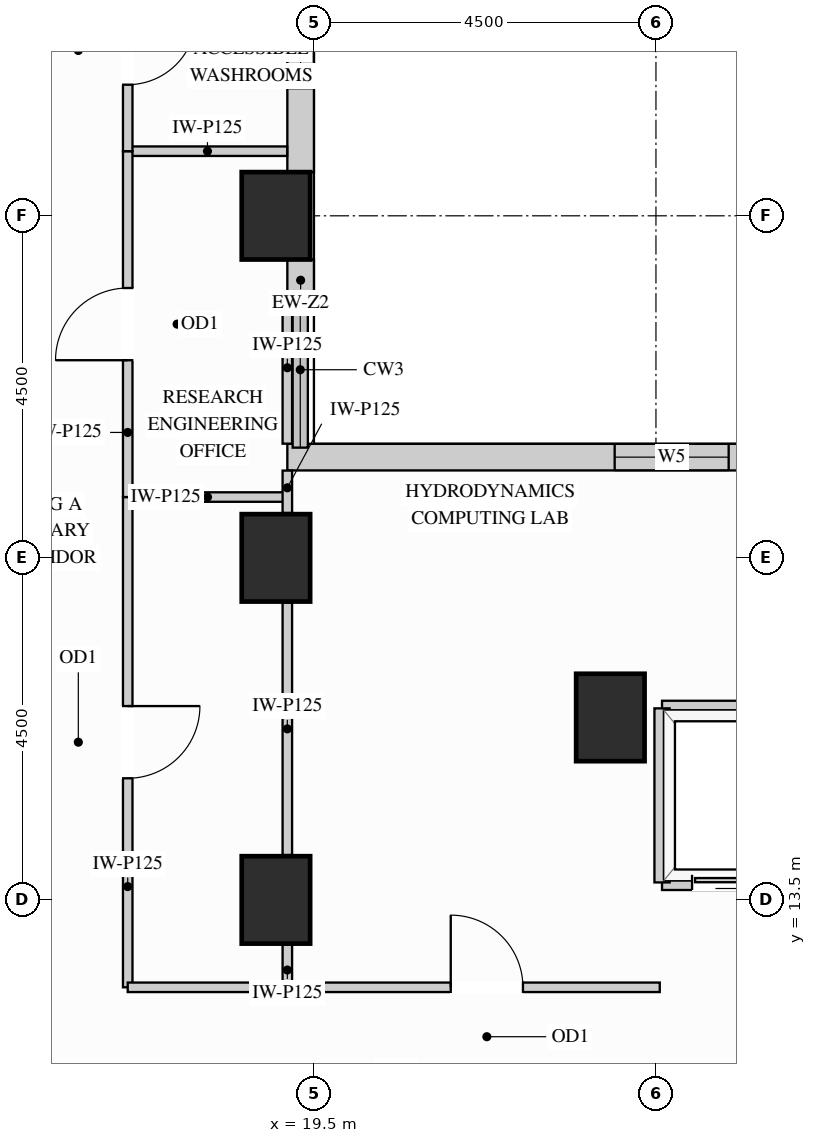
"""IFC4 building model, lengths in metres.
Left out: names, types, materials, properties, quantities, classifications, styles, units other than length and angle.
Written with IfcOpenShell. Run it as: python <this file> out.ifc"""

import sys

from ifc_helpers import new_model, si_unit, direction, frame, frame_2d, origin, origin_2d, place, context, subcontext, project, spatial, rectangle, extrude, source, transform, mapped, element, fill, save


model = new_model("IFC4")
c1 = context("Model", 3, precision=1e-05, world=origin(), true_north=direction((0.0, 1.0)))
c2 = subcontext(c1, "Body", "Model", "MODEL_VIEW")
j1 = project(units=[si_unit("LENGTHUNIT", "METRE"), si_unit("PLANEANGLEUNIT", "RADIAN")], contexts=[c1])
p1 = place(None, origin())
s1 = spatial("IfcSite", under=j1, at=p1, CompositionType="ELEMENT")
p2 = place(p1, origin())
s2 = spatial("IfcBuilding", under=s1, at=p2, CompositionType="ELEMENT")
p3 = place(p2, frame((0.0, 0.0, 95.4)))
s3 = spatial("IfcBuildingStorey", under=s2, at=p3, CompositionType="ELEMENT", Elevation=95.4)
m1 = source(origin(), c2, "Body", "SweptSolid", [
    extrude(rectangle(XDim=0.9, YDim=1.15, at=origin_2d()), origin(), (0.0, 0.0, 1.0), 3.38),
])
for number, where, z_axis, x_axis in (
    (1, (19.0, 13.5, 0.0), (0.0, 0.0, 1.0), (1.0, 0.0, 0.0)),
    (2, (19.0, 18.0, 0.0), (0.0, 0.0, 1.0), (1.0, 0.0, 0.0)),
    (3, (19.0, 22.5, 0.0), (0.0, 0.0, 1.0), (1.0, 0.0, 0.0)),
    (4, (23.4, 15.9, 0.0), (0.0, 0.0, 1.0), (1.0, 0.0, 0.0)),
):
    element("IfcColumn", number, at=place(p3, frame(where, z_axis=z_axis, x_axis=x_axis)), inside=s3, PredefinedType="COLUMN", context=c2, shape_type="MappedRepresentation", body=[
        mapped(m1, transform((0.0, 0.0, 0.0), x_axis=(1.0, 0.0, 0.0), y_axis=(0.0, 1.0, 0.0), z_axis=(0.0, 0.0, 1.0))),
    ])
m2 = source(origin(), c2, "Body", "SweptSolid", [
    extrude(rectangle(XDim=0.427, YDim=0.35, at=frame_2d((0.213, 0.0))), origin(), (0.0, 0.0, 1.0), 2.519),
])
p4 = place(p3, frame((19.325, 21.5, 0.0), z_axis=(0.0, 0.0, 1.0), x_axis=(0.0, 1.0, 0.0)))
e5 = element("IfcWall", 5, at=p4, inside=s3, PredefinedType="SOLIDWALL", context=c2, shape_type="MappedRepresentation", body=[
    mapped(m2, transform((0.0, 0.0, 0.0), x_axis=(1.0, 0.0, 0.0), y_axis=(0.0, 1.0, 0.0), z_axis=(0.0, 0.0, 1.0))),
])
p5 = place(p3, frame((19.325, 23.073, 0.0), z_axis=(0.0, 0.0, 1.0), x_axis=(0.0, 1.0, 0.0)))
e6 = element("IfcWall", 6, at=p5, inside=s3, PredefinedType="SOLIDWALL", context=c2, shape_type="SweptSolid", body=[
    extrude(rectangle(XDim=3.154, YDim=0.35, at=frame_2d((1.577, 0.0))), origin(), (0.0, 0.0, 1.0), 2.519),
])
p6 = place(p5, frame((1.105, 0.0, 0.78)))
e7 = element("IfcOpeningElement", 7, at=p6, cuts=e6, PredefinedType="OPENING", context=c2, shape_type="SweptSolid", body=[
    extrude(rectangle(XDim=1.5, YDim=1.559, at=frame_2d((0.75, 0.78))), frame((0.0, 0.185, 0.0), z_axis=(0.0, -1.0, 0.0), x_axis=(1.0, 0.0, 0.0)), (0.0, 0.0, 1.0), 0.37),
])
p7 = place(p3, frame((34.75, 19.325, 0.0), z_axis=(0.0, 0.0, 1.0), x_axis=(-1.0, 0.0, 0.0)))
e8 = element("IfcWall", 8, at=p7, inside=s3, PredefinedType="SOLIDWALL", context=c2, shape_type="SweptSolid", body=[
    extrude(rectangle(XDim=15.6, YDim=0.35, at=frame_2d((7.8, 0.0))), origin(), (0.0, 0.0, 1.0), 3.365),
])
p8 = place(p7, frame((4.307, 0.0, 0.78)))
e9 = element("IfcOpeningElement", 9, at=p8, cuts=e8, PredefinedType="OPENING", context=c2, shape_type="SweptSolid", body=[
    extrude(rectangle(XDim=1.5, YDim=2.0, at=frame_2d((0.75, 1.0))), frame((0.0, 0.185, 0.0), z_axis=(0.0, -1.0, 0.0), x_axis=(1.0, 0.0, 0.0)), (0.0, 0.0, 1.0), 0.37),
])
p9 = place(p7, frame((9.793, 0.0, 0.78)))
e10 = element("IfcOpeningElement", 10, at=p9, cuts=e8, PredefinedType="OPENING", context=c2, shape_type="SweptSolid", body=[
    extrude(rectangle(XDim=1.5, YDim=2.0, at=frame_2d((0.75, 1.0))), frame((0.0, 0.185, 0.0), z_axis=(0.0, -1.0, 0.0), x_axis=(1.0, 0.0, 0.0)), (0.0, 0.0, 1.0), 0.37),
])
m3 = source(origin(), c2, "Body", "SweptSolid", [
    extrude(rectangle(XDim=2.1, YDim=0.125, at=frame_2d((1.05, 0.0))), origin(), (0.0, 0.0, 1.0), 3.365),
])
p10 = place(p3, frame((17.05, 18.8, 0.0), z_axis=(0.0, 0.0, 1.0), x_axis=(1.0, 0.0, 0.0)))
e11 = element("IfcWall", 11, at=p10, inside=s3, PredefinedType="PARTITIONING", context=c2, shape_type="MappedRepresentation", body=[
    mapped(m3, transform((0.0, 0.0, 0.0), x_axis=(1.0, 0.0, 0.0), y_axis=(0.0, 1.0, 0.0), z_axis=(0.0, 0.0, 1.0))),
])
m4 = source(origin(), c2, "Body", "SweptSolid", [
    extrude(rectangle(XDim=2.098, YDim=0.125, at=frame_2d((1.049, 0.0))), origin(), (0.0, 0.0, 1.0), 3.365),
])
p11 = place(p3, frame((17.05, 23.35, 0.0), z_axis=(0.0, 0.0, 1.0), x_axis=(1.0, 0.0, 0.0)))
e12 = element("IfcWall", 12, at=p11, inside=s3, PredefinedType="PARTITIONING", context=c2, shape_type="MappedRepresentation", body=[
    mapped(m4, transform((0.0, 0.0, 0.0), x_axis=(1.0, 0.0, 0.0), y_axis=(0.0, 1.0, 0.0), z_axis=(0.0, 0.0, 1.0))),
])
m5 = source(origin(), c2, "Body", "SweptSolid", [
    extrude(rectangle(XDim=0.56, YDim=0.125, at=frame_2d((0.28, 0.0))), origin(), (0.0, 0.0, 1.0), 2.677),
])
p12 = place(p3, frame((19.15, 12.35, 0.0), z_axis=(0.0, 0.0, 1.0), x_axis=(0.0, 1.0, 0.0)))
e13 = element("IfcWall", 13, at=p12, inside=s3, PredefinedType="PARTITIONING", context=c2, shape_type="MappedRepresentation", body=[
    mapped(m5, transform((0.0, 0.0, 0.0), x_axis=(1.0, 0.0, 0.0), y_axis=(0.0, 1.0, 0.0), z_axis=(0.0, 0.0, 1.0))),
])
m6 = source(origin(), c2, "Body", "SweptSolid", [
    extrude(rectangle(XDim=3.32, YDim=0.125, at=frame_2d((1.66, 0.0))), origin(), (0.0, 0.0, 1.0), 2.677),
])
p13 = place(p3, frame((19.15, 14.09, 0.0), z_axis=(0.0, 0.0, 1.0), x_axis=(0.0, 1.0, 0.0)))
e14 = element("IfcWall", 14, at=p13, inside=s3, PredefinedType="PARTITIONING", context=c2, shape_type="MappedRepresentation", body=[
    mapped(m6, transform((0.0, 0.0, 0.0), x_axis=(1.0, 0.0, 0.0), y_axis=(0.0, 1.0, 0.0), z_axis=(0.0, 0.0, 1.0))),
])
m7 = source(origin(), c2, "Body", "SweptSolid", [
    extrude(rectangle(XDim=0.558, YDim=0.125, at=frame_2d((0.279, 0.0))), origin(), (0.0, 0.0, 1.0), 2.519),
])
p14 = place(p3, frame((19.15, 18.59, 0.0), z_axis=(0.0, 0.0, 1.0), x_axis=(0.0, 1.0, 0.0)))
e15 = element("IfcWall", 15, at=p14, inside=s3, PredefinedType="PARTITIONING", context=c2, shape_type="MappedRepresentation", body=[
    mapped(m7, transform((0.0, 0.0, 0.0), x_axis=(1.0, 0.0, 0.0), y_axis=(0.0, 1.0, 0.0), z_axis=(0.0, 0.0, 1.0))),
])
m8 = source(origin(), c2, "Body", "SweptSolid", [
    extrude(rectangle(XDim=1.998, YDim=0.125, at=frame_2d((0.999, 0.0))), origin(), (0.0, 0.0, 1.0), 2.519),
])
p15 = place(p3, frame((19.15, 19.502, 0.0), z_axis=(0.0, 0.0, 1.0), x_axis=(0.0, 1.0, 0.0)))
e16 = element("IfcWall", 16, at=p15, inside=s3, PredefinedType="PARTITIONING", context=c2, shape_type="MappedRepresentation", body=[
    mapped(m8, transform((0.0, 0.0, 0.0), x_axis=(1.0, 0.0, 0.0), y_axis=(0.0, 1.0, 0.0), z_axis=(0.0, 0.0, 1.0))),
])
p16 = place(p3, frame((17.05, 12.35, 0.0), z_axis=(0.0, 0.0, 1.0), x_axis=(0.0, 1.0, 0.0)))
e17 = element("IfcWall", 17, at=p16, inside=s3, PredefinedType="PARTITIONING", context=c2, shape_type="SweptSolid", body=[
    extrude(rectangle(XDim=6.45, YDim=0.125, at=frame_2d((3.225, 0.0))), origin(), (0.0, 0.0, 1.0), 3.365),
])
p17 = place(p16, frame((2.75, 0.0, 0.0)))
e18 = element("IfcOpeningElement", 18, at=p17, cuts=e17, PredefinedType="OPENING", context=c2, shape_type="SweptSolid", body=[
    extrude(rectangle(XDim=0.95, YDim=2.15, at=frame_2d((0.475, 1.075))), frame((0.0, 0.073, 0.0), z_axis=(0.0, -1.0, 0.0), x_axis=(1.0, 0.0, 0.0)), (0.0, 0.0, 1.0), 0.145),
])
p18 = place(p3, frame((17.05, 18.8, 0.0), z_axis=(0.0, 0.0, 1.0), x_axis=(0.0, 1.0, 0.0)))
e19 = element("IfcWall", 19, at=p18, inside=s3, PredefinedType="PARTITIONING", context=c2, shape_type="SweptSolid", body=[
    extrude(rectangle(XDim=4.55, YDim=0.125, at=frame_2d((2.275, 0.0))), origin(), (0.0, 0.0, 1.0), 3.365),
])
p19 = place(p18, frame((1.8, 0.0, 0.0)))
e20 = element("IfcOpeningElement", 20, at=p19, cuts=e19, PredefinedType="OPENING", context=c2, shape_type="SweptSolid", body=[
    extrude(rectangle(XDim=0.95, YDim=2.15, at=frame_2d((0.475, 1.075))), frame((0.0, 0.073, 0.0), z_axis=(0.0, -1.0, 0.0), x_axis=(1.0, 0.0, 0.0)), (0.0, 0.0, 1.0), 0.145),
])
p20 = place(p3, frame((17.05, 23.35, 0.0), z_axis=(0.0, 0.0, 1.0), x_axis=(0.0, 1.0, 0.0)))
e21 = element("IfcWall", 21, at=p20, inside=s3, PredefinedType="PARTITIONING", context=c2, shape_type="SweptSolid", body=[
    extrude(rectangle(XDim=2.7, YDim=0.125, at=frame_2d((1.35, 0.0))), origin(), (0.0, 0.0, 1.0), 3.365),
])
p21 = place(p20, frame((0.875, 0.0, 0.0)))
e22 = element("IfcOpeningElement", 22, at=p21, cuts=e21, PredefinedType="OPENING", context=c2, shape_type="SweptSolid", body=[
    extrude(rectangle(XDim=0.9, YDim=2.15, at=frame_2d((0.45, 1.075))), frame((0.0, 0.073, 0.0), z_axis=(0.0, -1.0, 0.0), x_axis=(1.0, 0.0, 0.0)), (0.0, 0.0, 1.0), 0.145),
])
m9 = source(origin(), c2, "Body", "SweptSolid", [
    extrude(rectangle(XDim=2.45, YDim=0.125, at=frame_2d((1.225, 0.0))), origin(), (0.0, 0.0, 1.0), 3.365),
])
p22 = place(p3, frame((17.05, 12.35, 0.0), z_axis=(0.0, 0.0, 1.0), x_axis=(1.0, 0.0, 0.0)))
e23 = element("IfcWall", 23, at=p22, inside=s3, PredefinedType="PARTITIONING", context=c2, shape_type="MappedRepresentation", body=[
    mapped(m9, transform((0.0, 0.0, 0.0), x_axis=(1.0, 0.0, 0.0), y_axis=(0.0, 1.0, 0.0), z_axis=(0.0, 0.0, 1.0))),
])
p23 = place(p3, frame((19.5, 12.35, 0.0), z_axis=(0.0, 0.0, 1.0), x_axis=(1.0, 0.0, 0.0)))
e24 = element("IfcWall", 24, at=p23, inside=s3, PredefinedType="PARTITIONING", context=c2, shape_type="SweptSolid", body=[
    extrude(rectangle(XDim=4.55, YDim=0.125, at=frame_2d((2.275, 0.0))), origin(), (0.0, 0.0, 1.0), 3.365),
])
p24 = place(p23, frame((1.8, 0.0, 0.0)))
e25 = element("IfcOpeningElement", 25, at=p24, cuts=e24, PredefinedType="OPENING", context=c2, shape_type="SweptSolid", body=[
    extrude(rectangle(XDim=0.95, YDim=2.15, at=frame_2d((0.475, 1.075))), frame((0.0, 0.073, 0.0), z_axis=(0.0, -1.0, 0.0), x_axis=(1.0, 0.0, 0.0)), (0.0, 0.0, 1.0), 0.145),
])
m10 = source(origin(), c2, "Body", "SweptSolid", [
    extrude(rectangle(XDim=1.89, YDim=0.2, at=frame_2d((0.945, 0.0))), origin(), (0.0, 0.0, 1.0), 2.677),
])
p25 = place(p3, frame((24.08, 16.02, 0.0), z_axis=(0.0, 0.0, 1.0), x_axis=(1.0, 0.0, 0.0)))
e26 = element("IfcWall", 26, at=p25, inside=s3, PredefinedType="PARTITIONING", context=c2, shape_type="MappedRepresentation", body=[
    mapped(m10, transform((0.0, 0.0, 0.0), x_axis=(1.0, 0.0, 0.0), y_axis=(0.0, 1.0, 0.0), z_axis=(0.0, 0.0, 1.0))),
])
p26 = place(p3, frame((24.08, 13.73, 0.0), z_axis=(0.0, 0.0, 1.0), x_axis=(1.0, 0.0, 0.0)))
e27 = element("IfcWall", 27, at=p26, inside=s3, PredefinedType="PARTITIONING", context=c2, shape_type="SweptSolid", body=[
    extrude(rectangle(XDim=1.89, YDim=0.2, at=frame_2d((0.945, 0.0))), origin(), (0.0, 0.0, 1.0), 2.446),
])
p27 = place(p26, frame((0.395, 0.0, 0.0)))
e28 = element("IfcOpeningElement", 28, at=p27, cuts=e27, PredefinedType="OPENING", context=c2, shape_type="SweptSolid", body=[
    extrude(rectangle(XDim=1.1, YDim=2.2, at=frame_2d((0.55, 1.1))), frame((0.0, 0.11, 0.0), z_axis=(0.0, -1.0, 0.0), x_axis=(1.0, 0.0, 0.0)), (0.0, 0.0, 1.0), 0.22),
])
m11 = source(origin(), c2, "Body", "SweptSolid", [
    extrude(rectangle(XDim=2.29, YDim=0.2, at=frame_2d((1.145, 0.0))), origin(), (0.0, 0.0, 1.0), 3.365),
])
p28 = place(p3, frame((24.08, 13.73, 0.0), z_axis=(0.0, 0.0, 1.0), x_axis=(0.0, 1.0, 0.0)))
e29 = element("IfcWall", 29, at=p28, inside=s3, PredefinedType="PARTITIONING", context=c2, shape_type="MappedRepresentation", body=[
    mapped(m11, transform((0.0, 0.0, 0.0), x_axis=(1.0, 0.0, 0.0), y_axis=(0.0, 1.0, 0.0), z_axis=(0.0, 0.0, 1.0))),
])
m12 = source(origin(), c2, "Body", "SweptSolid", [
    extrude(rectangle(XDim=1.1, YDim=2.2, at=frame_2d((0.55, 1.1))), frame((0.0, 0.025, 0.0), z_axis=(0.0, -1.0, 0.0), x_axis=(1.0, 0.0, 0.0)), (0.0, 0.0, 1.0), 0.05),
])
p29 = place(p27, origin())
e30 = element("IfcDoor", 30, at=p29, inside=s3, OperationType="SLIDING_TO_LEFT", PredefinedType="DOOR", context=c2, shape_type="MappedRepresentation", body=[
    mapped(m12, transform((0.0, 0.0, 0.0), x_axis=(1.0, 0.0, 0.0), y_axis=(0.0, 1.0, 0.0), z_axis=(0.0, 0.0, 1.0))),
])
fill(e28, e30)
m13 = source(origin(), c2, "Body", "SweptSolid", [
    extrude(rectangle(XDim=0.95, YDim=2.15, at=frame_2d((0.475, 1.075))), frame((0.0, 0.025, 0.0), z_axis=(0.0, -1.0, 0.0), x_axis=(1.0, 0.0, 0.0)), (0.0, 0.0, 1.0), 0.05),
])
p30 = place(p17, origin())
e31 = element("IfcDoor", 31, at=p30, inside=s3, OperationType="SINGLE_SWING_RIGHT", PredefinedType="DOOR", context=c2, shape_type="MappedRepresentation", body=[
    mapped(m13, transform((0.0, 0.0, 0.0), x_axis=(1.0, 0.0, 0.0), y_axis=(0.0, 1.0, 0.0), z_axis=(0.0, 0.0, 1.0))),
])
fill(e18, e31)
p31 = place(p19, origin())
e32 = element("IfcDoor", 32, at=p31, inside=s3, OperationType="SINGLE_SWING_LEFT", PredefinedType="DOOR", context=c2, shape_type="MappedRepresentation", body=[
    mapped(m13, transform((0.0, 0.0, 0.0), x_axis=(1.0, 0.0, 0.0), y_axis=(0.0, 1.0, 0.0), z_axis=(0.0, 0.0, 1.0))),
])
fill(e20, e32)
p32 = place(p24, origin())
e33 = element("IfcDoor", 33, at=p32, inside=s3, OperationType="SINGLE_SWING_LEFT", PredefinedType="DOOR", context=c2, shape_type="MappedRepresentation", body=[
    mapped(m13, transform((0.0, 0.0, 0.0), x_axis=(1.0, 0.0, 0.0), y_axis=(0.0, 1.0, 0.0), z_axis=(0.0, 0.0, 1.0))),
])
fill(e25, e33)
m14 = source(origin(), c2, "Body", "SweptSolid", [
    extrude(rectangle(XDim=0.9, YDim=2.15, at=frame_2d((0.45, 1.075))), frame((0.0, 0.025, 0.0), z_axis=(0.0, -1.0, 0.0), x_axis=(1.0, 0.0, 0.0)), (0.0, 0.0, 1.0), 0.05),
])
p33 = place(p21, origin())
e34 = element("IfcDoor", 34, at=p33, inside=s3, OperationType="SINGLE_SWING_RIGHT", PredefinedType="DOOR", context=c2, shape_type="MappedRepresentation", body=[
    mapped(m14, transform((0.0, 0.0, 0.0), x_axis=(1.0, 0.0, 0.0), y_axis=(0.0, 1.0, 0.0), z_axis=(0.0, 0.0, 1.0))),
])
fill(e22, e34)
m15 = source(origin(), c2, "Body", "SweptSolid", [
    extrude(rectangle(XDim=1.5, YDim=1.559, at=frame_2d((0.75, 0.78))), frame((0.0, 0.03, 0.0), z_axis=(0.0, -1.0, 0.0), x_axis=(1.0, 0.0, 0.0)), (0.0, 0.0, 1.0), 0.06),
])
p34 = place(p6, origin())
e35 = element("IfcWindow", 35, at=p34, inside=s3, PartitioningType="SINGLE_PANEL", PredefinedType="WINDOW", context=c2, shape_type="MappedRepresentation", body=[
    mapped(m15, transform((0.0, 0.0, 0.0), x_axis=(1.0, 0.0, 0.0), y_axis=(0.0, 1.0, 0.0), z_axis=(0.0, 0.0, 1.0))),
])
fill(e7, e35)
m16 = source(origin(), c2, "Body", "SweptSolid", [
    extrude(rectangle(XDim=1.5, YDim=2.0, at=frame_2d((0.75, 1.0))), frame((0.0, 0.03, 0.0), z_axis=(0.0, -1.0, 0.0), x_axis=(1.0, 0.0, 0.0)), (0.0, 0.0, 1.0), 0.06),
])
p35 = place(p9, origin())
e36 = element("IfcWindow", 36, at=p35, inside=s3, PartitioningType="SINGLE_PANEL", PredefinedType="WINDOW", context=c2, shape_type="MappedRepresentation", body=[
    mapped(m16, transform((0.0, 0.0, 0.0), x_axis=(1.0, 0.0, 0.0), y_axis=(0.0, 1.0, 0.0), z_axis=(0.0, 0.0, 1.0))),
])
fill(e10, e36)
save(model, sys.argv[1])
